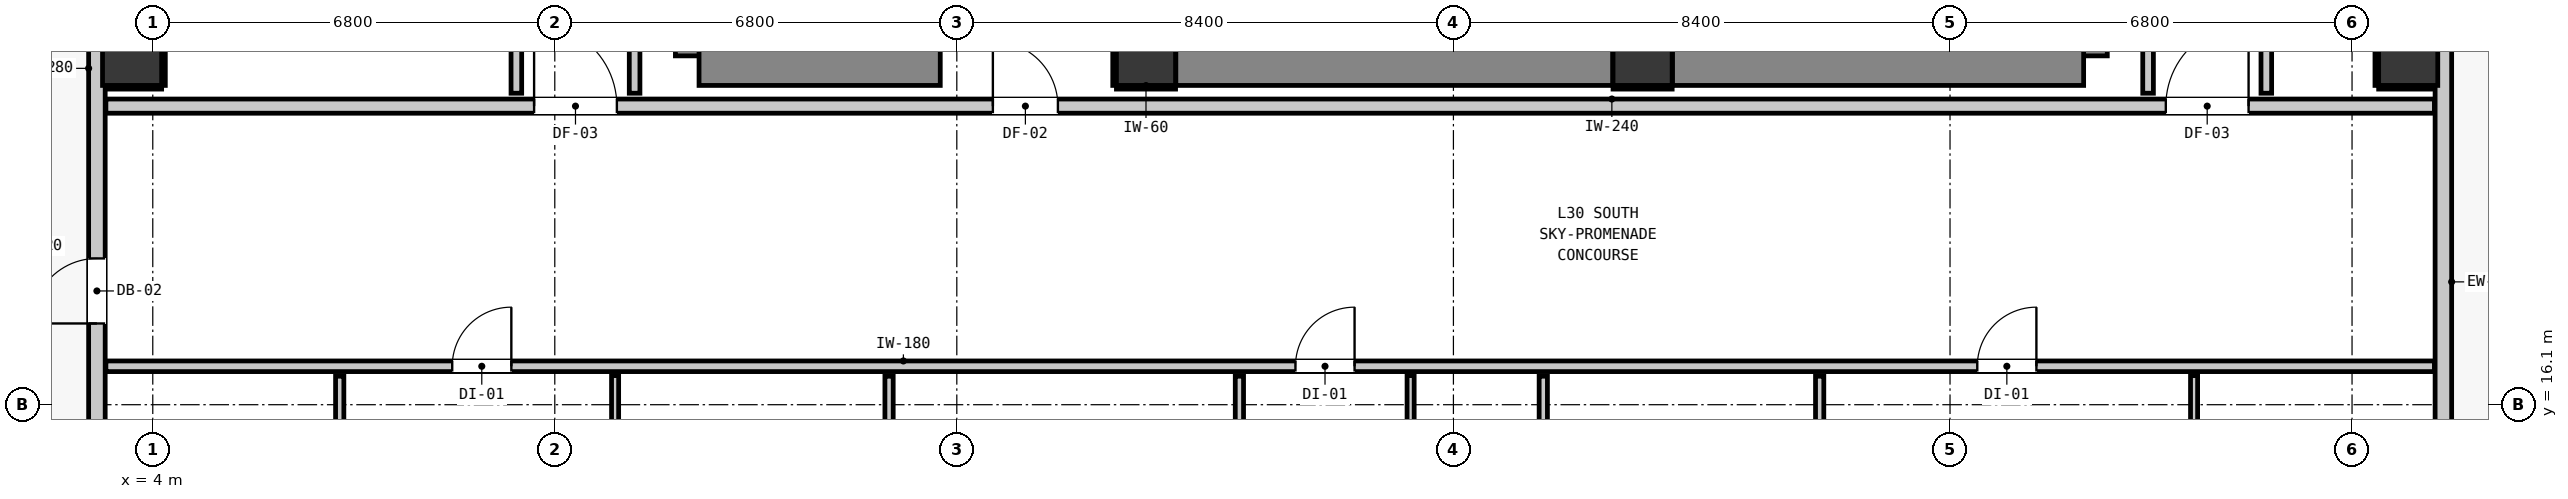
"""IFC4 building model, lengths in metres.
Left out: names, types, materials, properties, quantities, classifications, styles, units other than length and angle.
Written with IfcOpenShell. Run it as: python <this file> out.ifc"""

import sys

from ifc_helpers import new_model, si_unit, direction, frame, frame_2d, origin, origin_2d, place, context, subcontext, project, spatial, rectangle, extrude, element, fill, save


model = new_model("IFC4")
c1 = context("Model", 3, precision=1e-05, world=origin(), true_north=direction((0.0, 1.0)))
c2 = subcontext(c1, "Body", "Model", "MODEL_VIEW")
j1 = project(units=[si_unit("LENGTHUNIT", "METRE"), si_unit("PLANEANGLEUNIT", "RADIAN")], contexts=[c1])
p1 = place(None, origin())
s1 = spatial("IfcSite", under=j1, at=p1, CompositionType="ELEMENT")
p2 = place(p1, origin())
s2 = spatial("IfcBuilding", under=s1, at=p2, CompositionType="ELEMENT")
p3 = place(p2, frame((0.0, 0.0, 106.08)))
s3 = spatial("IfcBuildingStorey", under=s2, at=p3, CompositionType="ELEMENT", Elevation=106.08)
for number, where, z_axis, x_axis in (
    (1, (20.8, 22.0, 0.0), (0.0, 0.0, 1.0), (1.0, 0.0, 0.0)),
    (2, (29.2, 22.0, 0.0), (0.0, 0.0, 1.0), (1.0, 0.0, 0.0)),
):
    element("IfcColumn", number, at=place(p3, frame(where, z_axis=z_axis, x_axis=x_axis)), inside=s3, PredefinedType="COLUMN", context=c2, shape_type="SweptSolid", body=[
        extrude(rectangle(XDim=1.0, YDim=1.0, at=origin_2d()), origin(), (0.0, 0.0, 1.0), 3.32),
    ])
p4 = place(p3, frame((13.34, 22.0, 0.0), z_axis=(0.0, 0.0, 1.0), x_axis=(0.0, 1.0, 0.0)))
e3 = element("IfcWall", 3, at=p4, inside=s3, PredefinedType="SHEAR", context=c2, shape_type="SweptSolid", body=[
    extrude(rectangle(XDim=8.195, YDim=1.0, at=frame_2d((4.098, 0.0))), origin(), (0.0, 0.0, 1.0), 3.32),
])
p5 = place(p3, frame((13.24, 22.0, 0.0), z_axis=(0.0, 0.0, 1.0), x_axis=(1.0, 0.0, 0.0)))
e4 = element("IfcWall", 4, at=p5, inside=s3, PredefinedType="SHEAR", context=c2, shape_type="SweptSolid", body=[
    extrude(rectangle(XDim=4.08, YDim=1.0, at=frame_2d((2.04, 0.0))), origin(), (0.0, 0.0, 1.0), 3.32),
])
p6 = place(p3, frame((36.56, 22.0, 0.0), z_axis=(0.0, 0.0, 1.0), x_axis=(0.0, 1.0, 0.0)))
e5 = element("IfcWall", 5, at=p6, inside=s3, PredefinedType="SHEAR", context=c2, shape_type="SweptSolid", body=[
    extrude(rectangle(XDim=8.195, YDim=1.0, at=frame_2d((4.098, 0.0))), origin(), (0.0, 0.0, 1.0), 3.32),
])
p7 = place(p3, frame((29.705, 22.0, 0.0), z_axis=(0.0, 0.0, 1.0), x_axis=(1.0, 0.0, 0.0)))
e6 = element("IfcWall", 6, at=p7, inside=s3, PredefinedType="SHEAR", context=c2, shape_type="SweptSolid", body=[
    extrude(rectangle(XDim=6.955, YDim=1.0, at=frame_2d((3.478, 0.0))), origin(), (0.0, 0.0, 1.0), 3.32),
])
p8 = place(p3, frame((21.305, 22.0, 0.0), z_axis=(0.0, 0.0, 1.0), x_axis=(1.0, 0.0, 0.0)))
e7 = element("IfcWall", 7, at=p8, inside=s3, PredefinedType="SHEAR", context=c2, shape_type="SweptSolid", body=[
    extrude(rectangle(XDim=7.39, YDim=1.0, at=frame_2d((3.695, 0.0))), origin(), (0.0, 0.0, 1.0), 3.32),
])
for number, where, z_axis, x_axis in (
    (8, (3.65, 22.0, -0.2), (0.0, 0.0, 1.0), (1.0, 0.0, 0.0)),
    (9, (42.15, 22.0, -0.2), (0.0, 0.0, 1.0), (1.0, 0.0, 0.0)),
):
    element("IfcColumn", number, at=place(p3, frame(where, z_axis=z_axis, x_axis=x_axis)), inside=s3, PredefinedType="COLUMN", context=c2, shape_type="SweptSolid", body=[
        extrude(rectangle(XDim=1.0, YDim=1.0, at=origin_2d()), origin(), (0.0, 0.0, 1.0), 3.52),
    ])
p9 = place(p3, frame((3.055, 11.355, 0.0), z_axis=(0.0, 0.0, 1.0), x_axis=(0.0, 1.0, 0.0)))
e10 = element("IfcWall", 10, at=p9, inside=s3, PredefinedType="STANDARD", context=c2, shape_type="SweptSolid", body=[
    extrude(rectangle(XDim=32.29, YDim=0.28, at=frame_2d((16.145, 0.0))), origin(), (0.0, 0.0, 1.0), 3.08),
])
p10 = place(p9, frame((6.119, 0.0, 0.0)))
e11 = element("IfcOpeningElement", 11, at=p10, cuts=e10, PredefinedType="OPENING", context=c2, shape_type="SweptSolid", body=[
    extrude(rectangle(XDim=1.1, YDim=2.15, at=frame_2d((0.55, 1.075))), frame((0.0, 0.15, 0.0), z_axis=(0.0, -1.0, 0.0), x_axis=(1.0, 0.0, 0.0)), (0.0, 0.0, 1.0), 0.3),
])
p11 = place(p9, frame((0.545, 0.0, 0.85)))
e12 = element("IfcOpeningElement", 12, at=p11, cuts=e10, PredefinedType="OPENING", context=c2, shape_type="SweptSolid", body=[
    extrude(rectangle(XDim=1.05, YDim=1.65, at=frame_2d((0.525, 0.825))), frame((0.0, 0.15, 0.0), z_axis=(0.0, -1.0, 0.0), x_axis=(1.0, 0.0, 0.0)), (0.0, 0.0, 1.0), 0.3),
])
p12 = place(p9, frame((13.649, 0.0, 0.85)))
e13 = element("IfcOpeningElement", 13, at=p12, cuts=e10, PredefinedType="OPENING", context=c2, shape_type="SweptSolid", body=[
    extrude(rectangle(XDim=1.65, YDim=1.75, at=frame_2d((0.825, 0.875))), frame((0.0, 0.15, 0.0), z_axis=(0.0, -1.0, 0.0), x_axis=(1.0, 0.0, 0.0)), (0.0, 0.0, 1.0), 0.3),
])
p13 = place(p9, frame((16.887, 0.0, 0.85)))
e14 = element("IfcOpeningElement", 14, at=p13, cuts=e10, PredefinedType="OPENING", context=c2, shape_type="SweptSolid", body=[
    extrude(rectangle(XDim=1.65, YDim=1.75, at=frame_2d((0.825, 0.875))), frame((0.0, 0.15, 0.0), z_axis=(0.0, -1.0, 0.0), x_axis=(1.0, 0.0, 0.0)), (0.0, 0.0, 1.0), 0.3),
])
p14 = place(p9, frame((23.2, 0.0, 0.85)))
e15 = element("IfcOpeningElement", 15, at=p14, cuts=e10, PredefinedType="OPENING", context=c2, shape_type="SweptSolid", body=[
    extrude(rectangle(XDim=1.65, YDim=1.75, at=frame_2d((0.825, 0.875))), frame((0.0, 0.15, 0.0), z_axis=(0.0, -1.0, 0.0), x_axis=(1.0, 0.0, 0.0)), (0.0, 0.0, 1.0), 0.3),
])
p15 = place(p9, frame((26.312, 0.0, 0.85)))
e16 = element("IfcOpeningElement", 16, at=p15, cuts=e10, PredefinedType="OPENING", context=c2, shape_type="SweptSolid", body=[
    extrude(rectangle(XDim=1.05, YDim=1.65, at=frame_2d((0.525, 0.825))), frame((0.0, 0.15, 0.0), z_axis=(0.0, -1.0, 0.0), x_axis=(1.0, 0.0, 0.0)), (0.0, 0.0, 1.0), 0.3),
])
p16 = place(p3, frame((42.745, 43.645, 0.0), z_axis=(0.0, 0.0, 1.0), x_axis=(0.0, -1.0, 0.0)))
e17 = element("IfcWall", 17, at=p16, inside=s3, PredefinedType="STANDARD", context=c2, shape_type="SweptSolid", body=[
    extrude(rectangle(XDim=32.29, YDim=0.28, at=frame_2d((16.145, 0.0))), origin(), (0.0, 0.0, 1.0), 3.08),
])
p17 = place(p16, frame((6.821, 0.0, 0.0)))
e18 = element("IfcOpeningElement", 18, at=p17, cuts=e17, PredefinedType="OPENING", context=c2, shape_type="SweptSolid", body=[
    extrude(rectangle(XDim=1.1, YDim=2.15, at=frame_2d((0.55, 1.075))), frame((0.0, 0.15, 0.0), z_axis=(0.0, -1.0, 0.0), x_axis=(1.0, 0.0, 0.0)), (0.0, 0.0, 1.0), 0.3),
])
p18 = place(p16, frame((0.318, 0.0, 0.85)))
e19 = element("IfcOpeningElement", 19, at=p18, cuts=e17, PredefinedType="OPENING", context=c2, shape_type="SweptSolid", body=[
    extrude(rectangle(XDim=1.05, YDim=1.65, at=frame_2d((0.525, 0.825))), frame((0.0, 0.15, 0.0), z_axis=(0.0, -1.0, 0.0), x_axis=(1.0, 0.0, 0.0)), (0.0, 0.0, 1.0), 0.3),
])
p19 = place(p16, frame((16.895, 0.0, 0.85)))
e20 = element("IfcOpeningElement", 20, at=p19, cuts=e17, PredefinedType="OPENING", context=c2, shape_type="SweptSolid", body=[
    extrude(rectangle(XDim=1.65, YDim=1.75, at=frame_2d((0.825, 0.875))), frame((0.0, 0.15, 0.0), z_axis=(0.0, -1.0, 0.0), x_axis=(1.0, 0.0, 0.0)), (0.0, 0.0, 1.0), 0.3),
])
p20 = place(p16, frame((8.477, 0.0, 0.85)))
e21 = element("IfcOpeningElement", 21, at=p20, cuts=e17, PredefinedType="OPENING", context=c2, shape_type="SweptSolid", body=[
    extrude(rectangle(XDim=1.05, YDim=1.65, at=frame_2d((0.525, 0.825))), frame((0.0, 0.15, 0.0), z_axis=(0.0, -1.0, 0.0), x_axis=(1.0, 0.0, 0.0)), (0.0, 0.0, 1.0), 0.3),
])
p21 = place(p3, frame((3.207, 21.15, 0.0), z_axis=(0.0, 0.0, 1.0), x_axis=(1.0, 0.0, 0.0)))
e22 = element("IfcWall", 22, at=p21, inside=s3, PredefinedType="PARTITIONING", context=c2, shape_type="SweptSolid", body=[
    extrude(rectangle(XDim=39.386, YDim=0.24, at=frame_2d((19.693, 0.0))), origin(), (0.0, 0.0, 1.0), 3.08),
])
p22 = place(p21, frame((15.003, 0.0, 0.0)))
e23 = element("IfcOpeningElement", 23, at=p22, cuts=e22, PredefinedType="OPENING", context=c2, shape_type="SweptSolid", body=[
    extrude(rectangle(XDim=1.1, YDim=2.15, at=frame_2d((0.55, 1.075))), frame((0.0, 0.13, 0.0), z_axis=(0.0, -1.0, 0.0), x_axis=(1.0, 0.0, 0.0)), (0.0, 0.0, 1.0), 0.26),
])
p23 = place(p21, frame((7.243, 0.0, 0.0)))
e24 = element("IfcOpeningElement", 24, at=p23, cuts=e22, PredefinedType="OPENING", context=c2, shape_type="SweptSolid", body=[
    extrude(rectangle(XDim=1.4, YDim=2.15, at=frame_2d((0.7, 1.075))), frame((0.0, 0.13, 0.0), z_axis=(0.0, -1.0, 0.0), x_axis=(1.0, 0.0, 0.0)), (0.0, 0.0, 1.0), 0.26),
])
p24 = place(p21, frame((34.843, 0.0, 0.0)))
e25 = element("IfcOpeningElement", 25, at=p24, cuts=e22, PredefinedType="OPENING", context=c2, shape_type="SweptSolid", body=[
    extrude(rectangle(XDim=1.4, YDim=2.15, at=frame_2d((0.7, 1.075))), frame((0.0, 0.13, 0.0), z_axis=(0.0, -1.0, 0.0), x_axis=(1.0, 0.0, 0.0)), (0.0, 0.0, 1.0), 0.26),
])
p25 = place(p3, frame((3.207, 16.75, 0.0), z_axis=(0.0, 0.0, 1.0), x_axis=(1.0, 0.0, 0.0)))
e26 = element("IfcWall", 26, at=p25, inside=s3, PredefinedType="PARTITIONING", context=c2, shape_type="SweptSolid", body=[
    extrude(rectangle(XDim=39.386, YDim=0.18, at=frame_2d((19.693, 0.0))), origin(), (0.0, 0.0, 1.0), 3.08),
])
p26 = place(p25, frame((5.858, 0.0, 0.0)))
e27 = element("IfcOpeningElement", 27, at=p26, cuts=e26, PredefinedType="OPENING", context=c2, shape_type="SweptSolid", body=[
    extrude(rectangle(XDim=1.0, YDim=2.15, at=frame_2d((0.5, 1.075))), frame((0.0, 0.1, 0.0), z_axis=(0.0, -1.0, 0.0), x_axis=(1.0, 0.0, 0.0)), (0.0, 0.0, 1.0), 0.2),
])
p27 = place(p25, frame((20.121, 0.0, 0.0)))
e28 = element("IfcOpeningElement", 28, at=p27, cuts=e26, PredefinedType="OPENING", context=c2, shape_type="SweptSolid", body=[
    extrude(rectangle(XDim=1.0, YDim=2.15, at=frame_2d((0.5, 1.075))), frame((0.0, 0.1, 0.0), z_axis=(0.0, -1.0, 0.0), x_axis=(1.0, 0.0, 0.0)), (0.0, 0.0, 1.0), 0.2),
])
p28 = place(p25, frame((31.654, 0.0, 0.0)))
e29 = element("IfcOpeningElement", 29, at=p28, cuts=e26, PredefinedType="OPENING", context=c2, shape_type="SweptSolid", body=[
    extrude(rectangle(XDim=1.0, YDim=2.15, at=frame_2d((0.5, 1.075))), frame((0.0, 0.1, 0.0), z_axis=(0.0, -1.0, 0.0), x_axis=(1.0, 0.0, 0.0)), (0.0, 0.0, 1.0), 0.2),
])
p29 = place(p3, frame((10.15, 21.368, 0.0), z_axis=(0.0, 0.0, 1.0), x_axis=(0.0, 1.0, 0.0)))
e30 = element("IfcWall", 30, at=p29, inside=s3, PredefinedType="PARTITIONING", context=c2, shape_type="SweptSolid", body=[
    extrude(rectangle(XDim=2.298, YDim=0.18, at=frame_2d((1.149, 0.0))), origin(), (0.0, 0.0, 1.0), 3.08),
])
for number, where, z_axis, x_axis in (
    (31, (12.15, 21.368, 0.0), (0.0, 0.0, 1.0), (0.0, 1.0, 0.0)),
    (32, (37.75, 21.368, 0.0), (0.0, 0.0, 1.0), (0.0, 1.0, 0.0)),
):
    element("IfcWall", number, at=place(p3, frame(where, z_axis=z_axis, x_axis=x_axis)), inside=s3, PredefinedType="PARTITIONING", context=c2, shape_type="SweptSolid", body=[
        extrude(rectangle(XDim=18.694, YDim=0.18, at=frame_2d((9.347, 0.0))), origin(), (0.0, 0.0, 1.0), 3.08),
    ])
p30 = place(p3, frame((39.75, 21.368, 0.0), z_axis=(0.0, 0.0, 1.0), x_axis=(0.0, 1.0, 0.0)))
e33 = element("IfcWall", 33, at=p30, inside=s3, PredefinedType="PARTITIONING", context=c2, shape_type="SweptSolid", body=[
    extrude(rectangle(XDim=2.576, YDim=0.18, at=frame_2d((1.288, 0.0))), origin(), (0.0, 0.0, 1.0), 3.08),
])
p31 = place(p3, frame((7.162, 13.652, 0.0), z_axis=(0.0, 0.0, 1.0), x_axis=(0.0, 1.0, 0.0)))
e34 = element("IfcWall", 34, at=p31, inside=s3, PredefinedType="PARTITIONING", context=c2, shape_type="SweptSolid", body=[
    extrude(rectangle(XDim=2.93, YDim=0.14, at=frame_2d((1.465, 0.0))), origin(), (0.0, 0.0, 1.0), 3.08),
])
p32 = place(p31, frame((1.032, 0.0, 0.0)))
e35 = element("IfcOpeningElement", 35, at=p32, cuts=e34, PredefinedType="OPENING", context=c2, shape_type="SweptSolid", body=[
    extrude(rectangle(XDim=0.86, YDim=2.02, at=frame_2d((0.43, 1.01))), frame((0.0, 0.08, 0.0), z_axis=(0.0, -1.0, 0.0), x_axis=(1.0, 0.0, 0.0)), (0.0, 0.0, 1.0), 0.16),
])
p33 = place(p3, frame((16.454, 13.652, 0.0), z_axis=(0.0, 0.0, 1.0), x_axis=(0.0, 1.0, 0.0)))
e36 = element("IfcWall", 36, at=p33, inside=s3, PredefinedType="PARTITIONING", context=c2, shape_type="SweptSolid", body=[
    extrude(rectangle(XDim=2.93, YDim=0.14, at=frame_2d((1.465, 0.0))), origin(), (0.0, 0.0, 1.0), 3.08),
])
p34 = place(p3, frame((22.38, 13.652, 0.0), z_axis=(0.0, 0.0, 1.0), x_axis=(0.0, 1.0, 0.0)))
e37 = element("IfcWall", 37, at=p34, inside=s3, PredefinedType="PARTITIONING", context=c2, shape_type="SweptSolid", body=[
    extrude(rectangle(XDim=2.93, YDim=0.14, at=frame_2d((1.465, 0.0))), origin(), (0.0, 0.0, 1.0), 3.08),
])
p35 = place(p34, frame((1.032, 0.0, 0.0)))
e38 = element("IfcOpeningElement", 38, at=p35, cuts=e37, PredefinedType="OPENING", context=c2, shape_type="SweptSolid", body=[
    extrude(rectangle(XDim=0.86, YDim=2.02, at=frame_2d((0.43, 1.01))), frame((0.0, 0.08, 0.0), z_axis=(0.0, -1.0, 0.0), x_axis=(1.0, 0.0, 0.0)), (0.0, 0.0, 1.0), 0.16),
])
p36 = place(p3, frame((27.52, 13.652, 0.0), z_axis=(0.0, 0.0, 1.0), x_axis=(0.0, 1.0, 0.0)))
e39 = element("IfcWall", 39, at=p36, inside=s3, PredefinedType="PARTITIONING", context=c2, shape_type="SweptSolid", body=[
    extrude(rectangle(XDim=2.93, YDim=0.14, at=frame_2d((1.465, 0.0))), origin(), (0.0, 0.0, 1.0), 3.08),
])
p37 = place(p3, frame((32.195, 13.652, 0.0), z_axis=(0.0, 0.0, 1.0), x_axis=(0.0, 1.0, 0.0)))
e40 = element("IfcWall", 40, at=p37, inside=s3, PredefinedType="PARTITIONING", context=c2, shape_type="SweptSolid", body=[
    extrude(rectangle(XDim=2.93, YDim=0.14, at=frame_2d((1.465, 0.0))), origin(), (0.0, 0.0, 1.0), 3.08),
])
p38 = place(p37, frame((1.032, 0.0, 0.0)))
e41 = element("IfcOpeningElement", 41, at=p38, cuts=e40, PredefinedType="OPENING", context=c2, shape_type="SweptSolid", body=[
    extrude(rectangle(XDim=0.86, YDim=2.02, at=frame_2d((0.43, 1.01))), frame((0.0, 0.08, 0.0), z_axis=(0.0, -1.0, 0.0), x_axis=(1.0, 0.0, 0.0)), (0.0, 0.0, 1.0), 0.16),
])
p39 = place(p3, frame((11.82, 9.207, 0.0), z_axis=(0.0, 0.0, 1.0), x_axis=(0.0, 1.0, 0.0)))
e42 = element("IfcWall", 42, at=p39, inside=s3, PredefinedType="PARTITIONING", context=c2, shape_type="SweptSolid", body=[
    extrude(rectangle(XDim=7.385, YDim=0.12, at=frame_2d((3.692, 0.0))), origin(), (0.0, 0.0, 1.0), 3.08),
])
p40 = place(p39, frame((3.318, 0.0, 0.0)))
e43 = element("IfcOpeningElement", 43, at=p40, cuts=e42, PredefinedType="OPENING", context=c2, shape_type="SweptSolid", body=[
    extrude(rectangle(XDim=0.9, YDim=2.1, at=frame_2d((0.45, 1.05))), frame((0.0, 0.07, 0.0), z_axis=(0.0, -1.0, 0.0), x_axis=(1.0, 0.0, 0.0)), (0.0, 0.0, 1.0), 0.14),
])
p41 = place(p3, frame((25.276, 9.207, 0.0), z_axis=(0.0, 0.0, 1.0), x_axis=(0.0, 1.0, 0.0)))
e44 = element("IfcWall", 44, at=p41, inside=s3, PredefinedType="PARTITIONING", context=c2, shape_type="SweptSolid", body=[
    extrude(rectangle(XDim=7.385, YDim=0.12, at=frame_2d((3.692, 0.0))), origin(), (0.0, 0.0, 1.0), 3.08),
])
p42 = place(p41, frame((3.318, 0.0, 0.0)))
e45 = element("IfcOpeningElement", 45, at=p42, cuts=e44, PredefinedType="OPENING", context=c2, shape_type="SweptSolid", body=[
    extrude(rectangle(XDim=0.9, YDim=2.1, at=frame_2d((0.45, 1.05))), frame((0.0, 0.07, 0.0), z_axis=(0.0, -1.0, 0.0), x_axis=(1.0, 0.0, 0.0)), (0.0, 0.0, 1.0), 0.14),
])
p43 = place(p3, frame((38.528, 10.101, 0.0), z_axis=(0.0, 0.0, 1.0), x_axis=(0.0, 1.0, 0.0)))
e46 = element("IfcWall", 46, at=p43, inside=s3, PredefinedType="PARTITIONING", context=c2, shape_type="SweptSolid", body=[
    extrude(rectangle(XDim=6.491, YDim=0.12, at=frame_2d((3.246, 0.0))), origin(), (0.0, 0.0, 1.0), 2.565),
])
p44 = place(p43, frame((2.424, 0.0, 0.0)))
e47 = element("IfcOpeningElement", 47, at=p44, cuts=e46, PredefinedType="OPENING", context=c2, shape_type="SweptSolid", body=[
    extrude(rectangle(XDim=0.9, YDim=2.1, at=frame_2d((0.45, 1.05))), frame((0.0, 0.07, 0.0), z_axis=(0.0, -1.0, 0.0), x_axis=(1.0, 0.0, 0.0)), (0.0, 0.0, 1.0), 0.14),
])
for number, where, z_axis, x_axis in (
    (48, (20.3, 21.468, 0.0), (0.0, 0.0, 1.0), (1.0, 0.0, 0.0)),
    (49, (20.268, 21.5, 0.0), (0.0, 0.0, 1.0), (0.0, 1.0, 0.0)),
    (50, (28.7, 21.468, 0.0), (0.0, 0.0, 1.0), (1.0, 0.0, 0.0)),
):
    element("IfcWall", number, at=place(p3, frame(where, z_axis=z_axis, x_axis=x_axis)), inside=s3, PredefinedType="PARTITIONING", context=c2, shape_type="SweptSolid", body=[
        extrude(rectangle(XDim=1.0, YDim=0.06, at=frame_2d((0.5, 0.0))), origin(), (0.0, 0.0, 1.0), 1.45),
    ])
p45 = place(p3, frame((3.21, 21.468, 0.0), z_axis=(0.0, 0.0, 1.0), x_axis=(1.0, 0.0, 0.0)))
e51 = element("IfcWall", 51, at=p45, inside=s3, PredefinedType="PARTITIONING", context=c2, shape_type="SweptSolid", body=[
    extrude(rectangle(XDim=0.94, YDim=0.06, at=frame_2d((0.47, 0.0))), origin(), (0.0, 0.0, 1.0), 1.45),
])
p46 = place(p3, frame((4.182, 21.5, 0.0), z_axis=(0.0, 0.0, 1.0), x_axis=(0.0, 1.0, 0.0)))
e52 = element("IfcWall", 52, at=p46, inside=s3, PredefinedType="PARTITIONING", context=c2, shape_type="SweptSolid", body=[
    extrude(rectangle(XDim=1.0, YDim=0.06, at=frame_2d((0.5, 0.0))), origin(), (0.0, 0.0, 1.0), 1.45),
])
p47 = place(p3, frame((41.65, 21.468, 0.0), z_axis=(0.0, 0.0, 1.0), x_axis=(1.0, 0.0, 0.0)))
e53 = element("IfcWall", 53, at=p47, inside=s3, PredefinedType="PARTITIONING", context=c2, shape_type="SweptSolid", body=[
    extrude(rectangle(XDim=0.94, YDim=0.06, at=frame_2d((0.47, 0.0))), origin(), (0.0, 0.0, 1.0), 1.45),
])
p48 = place(p3, frame((41.618, 21.5, 0.0), z_axis=(0.0, 0.0, 1.0), x_axis=(0.0, 1.0, 0.0)))
e54 = element("IfcWall", 54, at=p48, inside=s3, PredefinedType="PARTITIONING", context=c2, shape_type="SweptSolid", body=[
    extrude(rectangle(XDim=1.0, YDim=0.06, at=frame_2d((0.5, 0.0))), origin(), (0.0, 0.0, 1.0), 1.45),
])
p49 = place(p10, origin())
e55 = element("IfcDoor", 55, at=p49, inside=s3, OperationType="SINGLE_SWING_LEFT", PredefinedType="DOOR", context=c2, shape_type="SweptSolid", body=[
    extrude(rectangle(XDim=1.1, YDim=2.15, at=frame_2d((0.55, 1.075))), frame((0.0, 0.025, 0.0), z_axis=(0.0, -1.0, 0.0), x_axis=(1.0, 0.0, 0.0)), (0.0, 0.0, 1.0), 0.05),
])
fill(e11, e55)
p50 = place(p22, origin())
e56 = element("IfcDoor", 56, at=p50, inside=s3, OperationType="SINGLE_SWING_LEFT", PredefinedType="DOOR", context=c2, shape_type="SweptSolid", body=[
    extrude(rectangle(XDim=1.1, YDim=2.15, at=frame_2d((0.55, 1.075))), frame((0.0, 0.025, 0.0), z_axis=(0.0, -1.0, 0.0), x_axis=(1.0, 0.0, 0.0)), (0.0, 0.0, 1.0), 0.05),
])
fill(e23, e56)
p51 = place(p23, origin())
e57 = element("IfcDoor", 57, at=p51, inside=s3, OperationType="SINGLE_SWING_LEFT", PredefinedType="DOOR", context=c2, shape_type="SweptSolid", body=[
    extrude(rectangle(XDim=1.4, YDim=2.15, at=frame_2d((0.7, 1.075))), frame((0.0, 0.025, 0.0), z_axis=(0.0, -1.0, 0.0), x_axis=(1.0, 0.0, 0.0)), (0.0, 0.0, 1.0), 0.05),
])
fill(e24, e57)
p52 = place(p24, origin())
e58 = element("IfcDoor", 58, at=p52, inside=s3, OperationType="SINGLE_SWING_RIGHT", PredefinedType="DOOR", context=c2, shape_type="SweptSolid", body=[
    extrude(rectangle(XDim=1.4, YDim=2.15, at=frame_2d((0.7, 1.075))), frame((0.0, 0.025, 0.0), z_axis=(0.0, -1.0, 0.0), x_axis=(1.0, 0.0, 0.0)), (0.0, 0.0, 1.0), 0.05),
])
fill(e25, e58)
p53 = place(p26, origin())
e59 = element("IfcDoor", 59, at=p53, inside=s3, OperationType="SINGLE_SWING_RIGHT", PredefinedType="DOOR", context=c2, shape_type="SweptSolid", body=[
    extrude(rectangle(XDim=1.0, YDim=2.15, at=frame_2d((0.5, 1.075))), frame((0.0, 0.025, 0.0), z_axis=(0.0, -1.0, 0.0), x_axis=(1.0, 0.0, 0.0)), (0.0, 0.0, 1.0), 0.05),
])
fill(e27, e59)
p54 = place(p27, origin())
e60 = element("IfcDoor", 60, at=p54, inside=s3, OperationType="SINGLE_SWING_RIGHT", PredefinedType="DOOR", context=c2, shape_type="SweptSolid", body=[
    extrude(rectangle(XDim=1.0, YDim=2.15, at=frame_2d((0.5, 1.075))), frame((0.0, 0.025, 0.0), z_axis=(0.0, -1.0, 0.0), x_axis=(1.0, 0.0, 0.0)), (0.0, 0.0, 1.0), 0.05),
])
fill(e28, e60)
p55 = place(p28, origin())
e61 = element("IfcDoor", 61, at=p55, inside=s3, OperationType="SINGLE_SWING_RIGHT", PredefinedType="DOOR", context=c2, shape_type="SweptSolid", body=[
    extrude(rectangle(XDim=1.0, YDim=2.15, at=frame_2d((0.5, 1.075))), frame((0.0, 0.025, 0.0), z_axis=(0.0, -1.0, 0.0), x_axis=(1.0, 0.0, 0.0)), (0.0, 0.0, 1.0), 0.05),
])
fill(e29, e61)
save(model, sys.argv[1])
